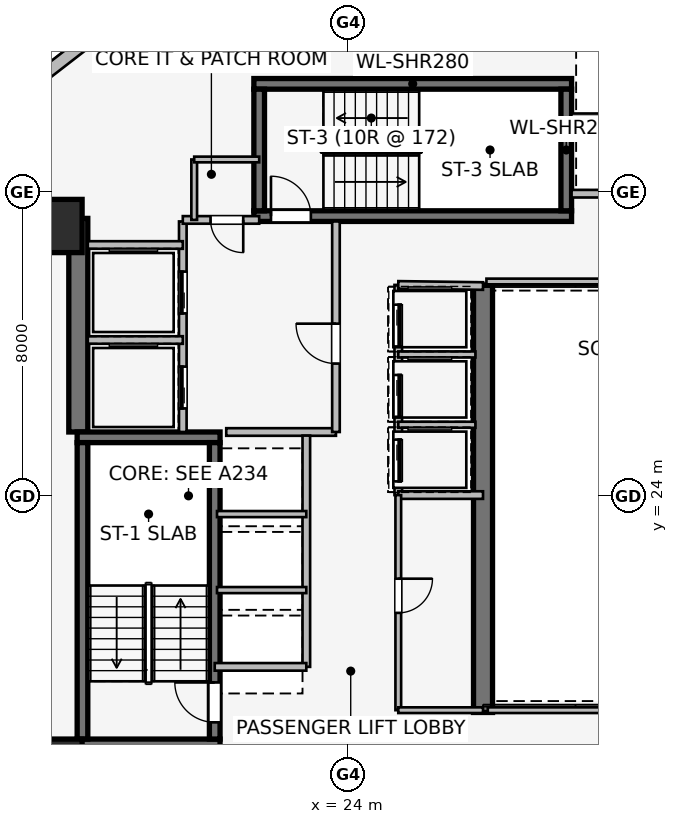
"""IFC4 building model, lengths in metres.
Left out: names, types, materials, properties, quantities, classifications, styles, units other than length and angle.
Written with IfcOpenShell. Run it as: python <this file> out.ifc"""

import sys

from ifc_helpers import new_model, si_unit, direction, frame, frame_2d, origin, origin_2d, place, context, subcontext, project, spatial, rectangle, extrude, element, fill, save


model = new_model("IFC4")
c1 = context("Model", 3, precision=1e-05, world=origin(), true_north=direction((0.0, 1.0)))
c2 = subcontext(c1, "Body", "Model", "MODEL_VIEW")
j1 = project(units=[si_unit("LENGTHUNIT", "METRE"), si_unit("PLANEANGLEUNIT", "RADIAN")], contexts=[c1])
p1 = place(None, origin())
s1 = spatial("IfcSite", under=j1, at=p1, CompositionType="ELEMENT")
p2 = place(p1, origin())
s2 = spatial("IfcBuilding", under=s1, at=p2, CompositionType="ELEMENT")
p3 = place(p2, frame((0.0, 0.0, 122.25)))
s3 = spatial("IfcBuildingStorey", under=s2, at=p3, CompositionType="ELEMENT", Elevation=122.25)
p4 = place(p3, frame((16.9, 25.68, 0.0), z_axis=(0.0, 0.0, 1.0), x_axis=(0.0, 1.0, 0.0)))
e1 = element("IfcWall", 1, at=p4, inside=s3, PredefinedType="SHEAR", context=c2, shape_type="SweptSolid", body=[
    extrude(rectangle(XDim=5.62, YDim=0.5, at=frame_2d((2.81, 0.0))), origin(), (0.0, 0.0, 1.0), 3.45),
])
p5 = place(p3, frame((27.55, 29.55, 0.0), z_axis=(0.0, 0.0, 1.0), x_axis=(0.0, -1.0, 0.0)))
e2 = element("IfcWall", 2, at=p5, inside=s3, PredefinedType="SHEAR", context=c2, shape_type="SweptSolid", body=[
    extrude(rectangle(XDim=11.25, YDim=0.5, at=frame_2d((5.625, 0.0))), origin(), (0.0, 0.0, 1.0), 3.45),
])
for number, where, z_axis, x_axis in (
    (3, (16.87, 17.46, 0.0), (0.0, 0.0, 1.0), (1.0, 0.0, 0.0)),
    (4, (20.63, 25.54, 0.0), (0.0, 0.0, 1.0), (-1.0, 0.0, 0.0)),
):
    element("IfcWall", number, at=place(p3, frame(where, z_axis=z_axis, x_axis=x_axis)), inside=s3, PredefinedType="SHEAR", context=c2, shape_type="SweptSolid", body=[
        extrude(rectangle(XDim=3.76, YDim=0.28, at=frame_2d((1.88, 0.0))), origin(), (0.0, 0.0, 1.0), 3.45),
    ])
p6 = place(p3, frame((17.01, 25.4, 0.0), z_axis=(0.0, 0.0, 1.0), x_axis=(0.0, -1.0, 0.0)))
e5 = element("IfcWall", 5, at=p6, inside=s3, PredefinedType="SHEAR", context=c2, shape_type="SweptSolid", body=[
    extrude(rectangle(XDim=7.8, YDim=0.28, at=frame_2d((3.9, 0.0))), origin(), (0.0, 0.0, 1.0), 3.45),
])
p7 = place(p3, frame((20.49, 17.6, 0.0), z_axis=(0.0, 0.0, 1.0), x_axis=(0.0, 1.0, 0.0)))
e6 = element("IfcWall", 6, at=p7, inside=s3, PredefinedType="SHEAR", context=c2, shape_type="SweptSolid", body=[
    extrude(rectangle(XDim=7.8, YDim=0.28, at=frame_2d((3.9, 0.0))), origin(), (0.0, 0.0, 1.0), 3.45),
])
p8 = place(p7, frame((0.44, 0.0, 0.0)))
e7 = element("IfcOpeningElement", 7, at=p8, cuts=e6, PredefinedType="OPENING", context=c2, shape_type="SweptSolid", body=[
    extrude(rectangle(XDim=1.05, YDim=2.0, at=frame_2d((0.525, 1.0))), frame((0.0, 0.15, 0.0), z_axis=(0.0, -1.0, 0.0), x_axis=(1.0, 0.0, 0.0)), (0.0, 0.0, 1.0), 0.3),
])
p9 = place(p3, frame((21.52, 31.36, 0.0), z_axis=(0.0, 0.0, 1.0), x_axis=(1.0, 0.0, 0.0)))
e8 = element("IfcWall", 8, at=p9, inside=s3, PredefinedType="SHEAR", context=c2, shape_type="SweptSolid", body=[
    extrude(rectangle(XDim=8.36, YDim=0.28, at=frame_2d((4.18, 0.0))), origin(), (0.0, 0.0, 1.0), 3.45),
])
p10 = place(p9, frame((0.45, 0.0, 0.0)))
e9 = element("IfcOpeningElement", 9, at=p10, cuts=e8, PredefinedType="OPENING", context=c2, shape_type="SweptSolid", body=[
    extrude(rectangle(XDim=1.05, YDim=2.0, at=frame_2d((0.525, 1.0))), frame((0.0, 0.15, 0.0), z_axis=(0.0, -1.0, 0.0), x_axis=(1.0, 0.0, 0.0)), (0.0, 0.0, 1.0), 0.3),
])
p11 = place(p3, frame((29.88, 34.84, 0.0), z_axis=(0.0, 0.0, 1.0), x_axis=(-1.0, 0.0, 0.0)))
e10 = element("IfcWall", 10, at=p11, inside=s3, PredefinedType="SHEAR", context=c2, shape_type="SweptSolid", body=[
    extrude(rectangle(XDim=8.36, YDim=0.28, at=frame_2d((4.18, 0.0))), origin(), (0.0, 0.0, 1.0), 3.45),
])
for number, where, z_axis, x_axis in (
    (11, (21.66, 34.7, 0.0), (0.0, 0.0, 1.0), (0.0, -1.0, 0.0)),
    (12, (29.74, 31.5, 0.0), (0.0, 0.0, 1.0), (0.0, 1.0, 0.0)),
):
    element("IfcWall", number, at=place(p3, frame(where, z_axis=z_axis, x_axis=x_axis)), inside=s3, PredefinedType="SHEAR", context=c2, shape_type="SweptSolid", body=[
        extrude(rectangle(XDim=3.2, YDim=0.28, at=frame_2d((1.6, 0.0))), origin(), (0.0, 0.0, 1.0), 3.45),
    ])
for number, where, z_axis, x_axis in (
    (13, (16.3, 16.9, 0.0), (0.0, 0.0, 1.0), (1.0, 0.0, 0.0)),
    (14, (16.3, 31.1, 0.0), (0.0, 0.0, 1.0), (1.0, 0.0, 0.0)),
):
    element("IfcColumn", number, at=place(p3, frame(where, z_axis=z_axis, x_axis=x_axis)), inside=s3, PredefinedType="COLUMN", context=c2, shape_type="SweptSolid", body=[
        extrude(rectangle(XDim=1.4, YDim=1.4, at=origin_2d()), origin(), (0.0, 0.0, 1.0), 3.45),
    ])
p12 = place(p3, frame((15.918, 35.024, 0.0), z_axis=(0.0, 0.0, 1.0), x_axis=(0.790621329885, 0.612305408053, 0.0)))
e15 = element("IfcWall", 15, at=p12, inside=s3, PredefinedType="STANDARD", context=c2, shape_type="SweptSolid", body=[
    extrude(rectangle(XDim=1.676, YDim=0.33, at=frame_2d((0.838, 0.0))), origin(), (0.0, 0.0, 1.0), 3.19),
])
p13 = place(p3, frame((19.65, 25.68, 0.0), z_axis=(0.0, 0.0, 1.0), x_axis=(0.0, 1.0, 0.0)))
e16 = element("IfcWall", 16, at=p13, inside=s3, PredefinedType="PARTITIONING", context=c2, shape_type="SweptSolid", body=[
    extrude(rectangle(XDim=5.54, YDim=0.2, at=frame_2d((2.77, 0.0))), origin(), (0.0, 0.0, 1.0), 3.19),
])
p14 = place(p13, frame((0.62, 0.0, 0.0)))
e17 = element("IfcOpeningElement", 17, at=p14, cuts=e16, PredefinedType="OPENING", context=c2, shape_type="SweptSolid", body=[
    extrude(rectangle(XDim=1.1, YDim=2.2, at=frame_2d((0.55, 1.1))), frame((0.0, 0.11, 0.0), z_axis=(0.0, -1.0, 0.0), x_axis=(1.0, 0.0, 0.0)), (0.0, 0.0, 1.0), 0.22),
])
p15 = place(p13, frame((3.12, 0.0, 0.0)))
e18 = element("IfcOpeningElement", 18, at=p15, cuts=e16, PredefinedType="OPENING", context=c2, shape_type="SweptSolid", body=[
    extrude(rectangle(XDim=1.1, YDim=2.2, at=frame_2d((0.55, 1.1))), frame((0.0, 0.11, 0.0), z_axis=(0.0, -1.0, 0.0), x_axis=(1.0, 0.0, 0.0)), (0.0, 0.0, 1.0), 0.22),
])
p16 = place(p3, frame((20.793, 25.68, 0.0), z_axis=(0.0, 0.0, 1.0), x_axis=(1.0, 0.0, 0.0)))
e19 = element("IfcWall", 19, at=p16, inside=s3, PredefinedType="PARTITIONING", context=c2, shape_type="SweptSolid", body=[
    extrude(rectangle(XDim=2.887, YDim=0.2, at=frame_2d((1.443, 0.0))), origin(), (0.0, 0.0, 1.0), 3.19),
])
p17 = place(p3, frame((23.68, 25.68, 0.0), z_axis=(0.0, 0.0, 1.0), x_axis=(0.0, 1.0, 0.0)))
e20 = element("IfcWall", 20, at=p17, inside=s3, PredefinedType="PARTITIONING", context=c2, shape_type="SweptSolid", body=[
    extrude(rectangle(XDim=5.54, YDim=0.2, at=frame_2d((2.77, 0.0))), origin(), (0.0, 0.0, 1.0), 3.19),
])
p18 = place(p17, frame((1.8, 0.0, 0.0)))
e21 = element("IfcOpeningElement", 21, at=p18, cuts=e20, PredefinedType="OPENING", context=c2, shape_type="SweptSolid", body=[
    extrude(rectangle(XDim=1.05, YDim=2.0, at=frame_2d((0.525, 1.0))), frame((0.0, 0.11, 0.0), z_axis=(0.0, -1.0, 0.0), x_axis=(1.0, 0.0, 0.0)), (0.0, 0.0, 1.0), 0.22),
])
p19 = place(p3, frame((21.66, 31.26, 0.0), z_axis=(0.0, 0.0, 1.0), x_axis=(-1.0, 0.0, 0.0)))
e22 = element("IfcWall", 22, at=p19, inside=s3, PredefinedType="PARTITIONING", context=c2, shape_type="SweptSolid", body=[
    extrude(rectangle(XDim=2.01, YDim=0.2, at=frame_2d((1.005, 0.0))), origin(), (0.0, 0.0, 1.0), 3.19),
])
p20 = place(p19, frame((0.42, 0.0, 0.0)))
e23 = element("IfcOpeningElement", 23, at=p20, cuts=e22, PredefinedType="OPENING", context=c2, shape_type="SweptSolid", body=[
    extrude(rectangle(XDim=0.86, YDim=2.0, at=frame_2d((0.43, 1.0))), frame((0.0, 0.11, 0.0), z_axis=(0.0, -1.0, 0.0), x_axis=(1.0, 0.0, 0.0)), (0.0, 0.0, 1.0), 0.22),
])
p21 = place(p3, frame((17.15, 28.1, 0.0), z_axis=(0.0, 0.0, 1.0), x_axis=(1.0, 0.0, 0.0)))
e24 = element("IfcWall", 24, at=p21, inside=s3, PredefinedType="PARTITIONING", context=c2, shape_type="SweptSolid", body=[
    extrude(rectangle(XDim=2.5, YDim=0.2, at=frame_2d((1.25, 0.0))), origin(), (0.0, 0.0, 1.0), 3.19),
])
p22 = place(p3, frame((19.65, 30.6, 0.0), z_axis=(0.0, 0.0, 1.0), x_axis=(-1.0, 0.0, 0.0)))
e25 = element("IfcWall", 25, at=p22, inside=s3, PredefinedType="PARTITIONING", context=c2, shape_type="SweptSolid", body=[
    extrude(rectangle(XDim=2.5, YDim=0.2, at=frame_2d((1.25, 0.0))), origin(), (0.0, 0.0, 1.0), 2.09),
])
p23 = place(p3, frame((32.48, 31.95, 0.0), z_axis=(0.0, 0.0, 1.0), x_axis=(-1.0, 0.0, 0.0)))
e26 = element("IfcWall", 26, at=p23, inside=s3, PredefinedType="PARTITIONING", context=c2, shape_type="SweptSolid", body=[
    extrude(rectangle(XDim=2.6, YDim=0.2, at=frame_2d((1.3, 0.0))), origin(), (0.0, 0.0, 1.0), 3.19),
])
p24 = place(p3, frame((29.875, 33.98, 0.0), z_axis=(0.0, 0.0, 1.0), x_axis=(1.0, 0.0, 0.0)))
e27 = element("IfcWall", 27, at=p24, inside=s3, PredefinedType="PARTITIONING", context=c2, shape_type="SweptSolid", body=[
    extrude(rectangle(XDim=2.605, YDim=0.16, at=frame_2d((1.302, 0.0))), origin(), (0.0, 0.0, 1.0), 3.19),
])
p25 = place(p3, frame((22.9, 19.5, 0.0), z_axis=(0.0, 0.0, 1.0), x_axis=(0.0, 1.0, 0.0)))
e28 = element("IfcWall", 28, at=p25, inside=s3, PredefinedType="PARTITIONING", context=c2, shape_type="SweptSolid", body=[
    extrude(rectangle(XDim=6.085, YDim=0.2, at=frame_2d((3.042, 0.0))), origin(), (0.0, 0.0, 1.0), 3.19),
])
p26 = place(p3, frame((20.49, 19.5, 0.0), z_axis=(0.0, 0.0, 1.0), x_axis=(1.0, 0.0, 0.0)))
e29 = element("IfcWall", 29, at=p26, inside=s3, PredefinedType="PARTITIONING", context=c2, shape_type="SweptSolid", body=[
    extrude(rectangle(XDim=2.41, YDim=0.2, at=frame_2d((1.205, 0.0))), origin(), (0.0, 0.0, 1.0), 2.09),
])
for number, where, z_axis, x_axis in (
    (30, (20.55, 21.52, 0.0), (0.0, 0.0, 1.0), (1.0, 0.0, 0.0)),
    (31, (20.55, 23.52, 0.0), (0.0, 0.0, 1.0), (1.0, 0.0, 0.0)),
):
    element("IfcWall", number, at=place(p3, frame(where, z_axis=z_axis, x_axis=x_axis)), inside=s3, PredefinedType="PARTITIONING", context=c2, shape_type="SweptSolid", body=[
        extrude(rectangle(XDim=2.35, YDim=0.16, at=frame_2d((1.175, 0.0))), origin(), (0.0, 0.0, 1.0), 3.19),
    ])
p27 = place(p3, frame((25.32, 29.55, 0.0), z_axis=(0.0, 0.0, 1.0), x_axis=(0.0, -1.0, 0.0)))
e32 = element("IfcWall", 32, at=p27, inside=s3, PredefinedType="PARTITIONING", context=c2, shape_type="SweptSolid", body=[
    extrude(rectangle(XDim=5.53, YDim=0.2, at=frame_2d((2.765, 0.0))), origin(), (0.0, 0.0, 1.0), 3.19),
])
p28 = place(p27, frame((0.52, 0.0, 0.0)))
e33 = element("IfcOpeningElement", 33, at=p28, cuts=e32, PredefinedType="OPENING", context=c2, shape_type="SweptSolid", body=[
    extrude(rectangle(XDim=1.1, YDim=2.2, at=frame_2d((0.55, 1.1))), frame((0.0, 0.11, 0.0), z_axis=(0.0, -1.0, 0.0), x_axis=(1.0, 0.0, 0.0)), (0.0, 0.0, 1.0), 0.22),
])
p29 = place(p27, frame((2.37, 0.0, 0.0)))
e34 = element("IfcOpeningElement", 34, at=p29, cuts=e32, PredefinedType="OPENING", context=c2, shape_type="SweptSolid", body=[
    extrude(rectangle(XDim=1.1, YDim=2.2, at=frame_2d((0.55, 1.1))), frame((0.0, 0.11, 0.0), z_axis=(0.0, -1.0, 0.0), x_axis=(1.0, 0.0, 0.0)), (0.0, 0.0, 1.0), 0.22),
])
p30 = place(p27, frame((4.07, 0.0, 0.0)))
e35 = element("IfcOpeningElement", 35, at=p30, cuts=e32, PredefinedType="OPENING", context=c2, shape_type="SweptSolid", body=[
    extrude(rectangle(XDim=1.1, YDim=2.2, at=frame_2d((0.55, 1.1))), frame((0.0, 0.11, 0.0), z_axis=(0.0, -1.0, 0.0), x_axis=(1.0, 0.0, 0.0)), (0.0, 0.0, 1.0), 0.22),
])
p31 = place(p3, frame((27.55, 29.52, 0.0), z_axis=(0.0, 0.0, 1.0), x_axis=(-0.999909343457, 0.013464949556, 0.0)))
e36 = element("IfcWall", 36, at=p31, inside=s3, PredefinedType="PARTITIONING", context=c2, shape_type="SweptSolid", body=[
    extrude(rectangle(XDim=2.23, YDim=0.2, at=frame_2d((1.115, 0.0))), origin(), (0.0, 0.0, 1.0), 2.09),
])
p32 = place(p3, frame((25.32, 24.02, 0.0), z_axis=(0.0, 0.0, 1.0), x_axis=(1.0, 0.0, 0.0)))
e37 = element("IfcWall", 37, at=p32, inside=s3, PredefinedType="PARTITIONING", context=c2, shape_type="SweptSolid", body=[
    extrude(rectangle(XDim=2.23, YDim=0.2, at=frame_2d((1.115, 0.0))), origin(), (0.0, 0.0, 1.0), 3.19),
])
for number, where, z_axis, x_axis in (
    (38, (25.32, 25.87, 0.0), (0.0, 0.0, 1.0), (1.0, 0.0, 0.0)),
    (39, (25.32, 27.72, 0.0), (0.0, 0.0, 1.0), (1.0, 0.0, 0.0)),
):
    element("IfcWall", number, at=place(p3, frame(where, z_axis=z_axis, x_axis=x_axis)), inside=s3, PredefinedType="PARTITIONING", context=c2, shape_type="SweptSolid", body=[
        extrude(rectangle(XDim=2.03, YDim=0.16, at=frame_2d((1.015, 0.0))), origin(), (0.0, 0.0, 1.0), 3.19),
    ])
p33 = place(p3, frame((25.32, 24.02, 0.0), z_axis=(0.0, 0.0, 1.0), x_axis=(0.0, -1.0, 0.0)))
e40 = element("IfcWall", 40, at=p33, inside=s3, PredefinedType="PARTITIONING", context=c2, shape_type="SweptSolid", body=[
    extrude(rectangle(XDim=5.66, YDim=0.15, at=frame_2d((2.83, 0.0))), origin(), (0.0, 0.0, 1.0), 3.19),
])
p34 = place(p33, frame((2.2, 0.0, 0.0)))
e41 = element("IfcOpeningElement", 41, at=p34, cuts=e40, PredefinedType="OPENING", context=c2, shape_type="SweptSolid", body=[
    extrude(rectangle(XDim=0.9, YDim=2.0, at=frame_2d((0.45, 1.0))), frame((0.0, 0.085, 0.0), z_axis=(0.0, -1.0, 0.0), x_axis=(1.0, 0.0, 0.0)), (0.0, 0.0, 1.0), 0.17),
])
p35 = place(p3, frame((25.32, 18.36, 0.0), z_axis=(0.0, 0.0, 1.0), x_axis=(1.0, 0.0, 0.0)))
e42 = element("IfcWall", 42, at=p35, inside=s3, PredefinedType="PARTITIONING", context=c2, shape_type="SweptSolid", body=[
    extrude(rectangle(XDim=2.23, YDim=0.15, at=frame_2d((1.115, 0.0))), origin(), (0.0, 0.0, 1.0), 3.19),
])
p36 = place(p3, frame((19.95, 32.85, 0.0), z_axis=(0.0, 0.0, 1.0), x_axis=(0.0, -1.0, 0.0)))
e43 = element("IfcWall", 43, at=p36, inside=s3, PredefinedType="PARTITIONING", context=c2, shape_type="SweptSolid", body=[
    extrude(rectangle(XDim=1.59, YDim=0.15, at=frame_2d((0.795, 0.0))), origin(), (0.0, 0.0, 1.0), 3.19),
])
p37 = place(p3, frame((21.66, 32.85, 0.0), z_axis=(0.0, 0.0, 1.0), x_axis=(-1.0, 0.0, 0.0)))
e44 = element("IfcWall", 44, at=p37, inside=s3, PredefinedType="PARTITIONING", context=c2, shape_type="SweptSolid", body=[
    extrude(rectangle(XDim=1.71, YDim=0.15, at=frame_2d((0.855, 0.0))), origin(), (0.0, 0.0, 1.0), 3.19),
])
p38 = place(p3, frame((27.675, 18.36, 0.0), z_axis=(0.0, 0.0, 1.0), x_axis=(1.0, 0.0, 0.0)))
e45 = element("IfcWall", 45, at=p38, inside=s3, PredefinedType="PARTITIONING", context=c2, shape_type="SweptSolid", body=[
    extrude(rectangle(XDim=12.165, YDim=0.15, at=frame_2d((6.083, 0.0))), origin(), (0.0, 0.0, 1.0), 2.331),
])
p39 = place(p3, frame((39.84, 29.64, 0.0), z_axis=(0.0, 0.0, 1.0), x_axis=(-1.0, 0.0, 0.0)))
e46 = element("IfcWall", 46, at=p39, inside=s3, PredefinedType="PARTITIONING", context=c2, shape_type="SweptSolid", body=[
    extrude(rectangle(XDim=12.2, YDim=0.15, at=frame_2d((6.1, 0.0))), origin(), (0.0, 0.0, 1.0), 2.331),
])
p40 = place(p8, origin())
e47 = element("IfcDoor", 47, at=p40, inside=s3, OperationType="SINGLE_SWING_RIGHT", PredefinedType="DOOR", context=c2, shape_type="SweptSolid", body=[
    extrude(rectangle(XDim=1.05, YDim=2.0, at=frame_2d((0.525, 1.0))), frame((0.0, 0.025, 0.0), z_axis=(0.0, -1.0, 0.0), x_axis=(1.0, 0.0, 0.0)), (0.0, 0.0, 1.0), 0.05),
])
fill(e7, e47)
p41 = place(p10, origin())
e48 = element("IfcDoor", 48, at=p41, inside=s3, OperationType="SINGLE_SWING_LEFT", PredefinedType="DOOR", context=c2, shape_type="SweptSolid", body=[
    extrude(rectangle(XDim=1.05, YDim=2.0, at=frame_2d((0.525, 1.0))), frame((0.0, 0.025, 0.0), z_axis=(0.0, -1.0, 0.0), x_axis=(1.0, 0.0, 0.0)), (0.0, 0.0, 1.0), 0.05),
])
fill(e9, e48)
p42 = place(p14, origin())
e49 = element("IfcDoor", 49, at=p42, inside=s3, OperationType="SLIDING_TO_LEFT", PredefinedType="DOOR", context=c2, shape_type="SweptSolid", body=[
    extrude(rectangle(XDim=1.1, YDim=2.2, at=frame_2d((0.55, 1.1))), frame((0.0, 0.025, 0.0), z_axis=(0.0, -1.0, 0.0), x_axis=(1.0, 0.0, 0.0)), (0.0, 0.0, 1.0), 0.05),
])
fill(e17, e49)
p43 = place(p15, origin())
e50 = element("IfcDoor", 50, at=p43, inside=s3, OperationType="SLIDING_TO_LEFT", PredefinedType="DOOR", context=c2, shape_type="SweptSolid", body=[
    extrude(rectangle(XDim=1.1, YDim=2.2, at=frame_2d((0.55, 1.1))), frame((0.0, 0.025, 0.0), z_axis=(0.0, -1.0, 0.0), x_axis=(1.0, 0.0, 0.0)), (0.0, 0.0, 1.0), 0.05),
])
fill(e18, e50)
p44 = place(p18, origin())
e51 = element("IfcDoor", 51, at=p44, inside=s3, OperationType="SINGLE_SWING_RIGHT", PredefinedType="DOOR", context=c2, shape_type="SweptSolid", body=[
    extrude(rectangle(XDim=1.05, YDim=2.0, at=frame_2d((0.525, 1.0))), frame((0.0, 0.025, 0.0), z_axis=(0.0, -1.0, 0.0), x_axis=(1.0, 0.0, 0.0)), (0.0, 0.0, 1.0), 0.05),
])
fill(e21, e51)
p45 = place(p20, origin())
e52 = element("IfcDoor", 52, at=p45, inside=s3, OperationType="SINGLE_SWING_LEFT", PredefinedType="DOOR", context=c2, shape_type="SweptSolid", body=[
    extrude(rectangle(XDim=0.86, YDim=2.0, at=frame_2d((0.43, 1.0))), frame((0.0, 0.025, 0.0), z_axis=(0.0, -1.0, 0.0), x_axis=(1.0, 0.0, 0.0)), (0.0, 0.0, 1.0), 0.05),
])
fill(e23, e52)
p46 = place(p28, origin())
e53 = element("IfcDoor", 53, at=p46, inside=s3, OperationType="SLIDING_TO_LEFT", PredefinedType="DOOR", context=c2, shape_type="SweptSolid", body=[
    extrude(rectangle(XDim=1.1, YDim=2.2, at=frame_2d((0.55, 1.1))), frame((0.0, 0.025, 0.0), z_axis=(0.0, -1.0, 0.0), x_axis=(1.0, 0.0, 0.0)), (0.0, 0.0, 1.0), 0.05),
])
fill(e33, e53)
p47 = place(p29, origin())
e54 = element("IfcDoor", 54, at=p47, inside=s3, OperationType="SLIDING_TO_LEFT", PredefinedType="DOOR", context=c2, shape_type="SweptSolid", body=[
    extrude(rectangle(XDim=1.1, YDim=2.2, at=frame_2d((0.55, 1.1))), frame((0.0, 0.025, 0.0), z_axis=(0.0, -1.0, 0.0), x_axis=(1.0, 0.0, 0.0)), (0.0, 0.0, 1.0), 0.05),
])
fill(e34, e54)
p48 = place(p30, origin())
e55 = element("IfcDoor", 55, at=p48, inside=s3, OperationType="SLIDING_TO_LEFT", PredefinedType="DOOR", context=c2, shape_type="SweptSolid", body=[
    extrude(rectangle(XDim=1.1, YDim=2.2, at=frame_2d((0.55, 1.1))), frame((0.0, 0.025, 0.0), z_axis=(0.0, -1.0, 0.0), x_axis=(1.0, 0.0, 0.0)), (0.0, 0.0, 1.0), 0.05),
])
fill(e35, e55)
p49 = place(p34, origin())
e56 = element("IfcDoor", 56, at=p49, inside=s3, OperationType="SINGLE_SWING_LEFT", PredefinedType="DOOR", context=c2, shape_type="SweptSolid", body=[
    extrude(rectangle(XDim=0.9, YDim=2.0, at=frame_2d((0.45, 1.0))), frame((0.0, 0.025, 0.0), z_axis=(0.0, -1.0, 0.0), x_axis=(1.0, 0.0, 0.0)), (0.0, 0.0, 1.0), 0.05),
])
fill(e41, e56)
save(model, sys.argv[1])
